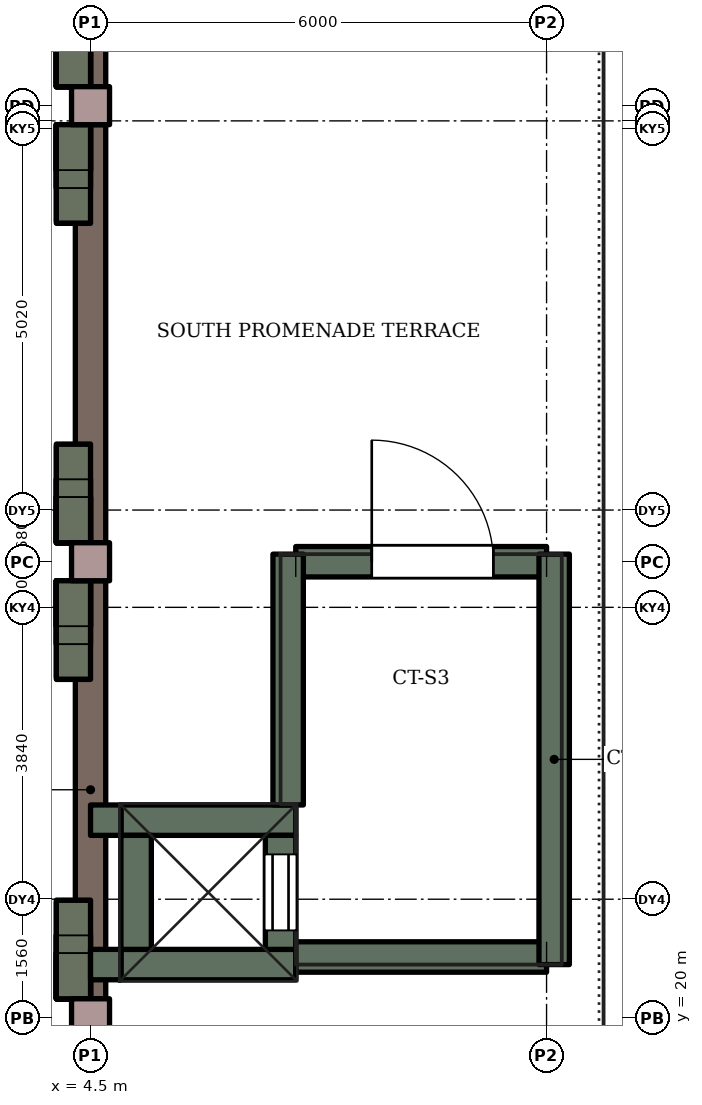
"""IFC4 building model, lengths in metres.
Left out: names, types, materials, properties, quantities, classifications, styles, units other than length and angle.
Written with IfcOpenShell. Run it as: python <this file> out.ifc"""

import sys

from ifc_helpers import new_model, si_unit, direction, frame, frame_2d, origin, origin_2d, place, context, subcontext, project, spatial, rectangle, extrude, element, fill, save


model = new_model("IFC4")
c1 = context("Model", 3, precision=1e-05, world=origin(), true_north=direction((0.0, 1.0)))
c2 = subcontext(c1, "Body", "Model", "MODEL_VIEW")
j1 = project(units=[si_unit("LENGTHUNIT", "METRE"), si_unit("PLANEANGLEUNIT", "RADIAN")], contexts=[c1])
p1 = place(None, origin())
s1 = spatial("IfcSite", under=j1, at=p1, CompositionType="ELEMENT")
p2 = place(p1, origin())
s2 = spatial("IfcBuilding", under=s1, at=p2, CompositionType="ELEMENT")
p3 = place(p2, frame((0.0, 0.0, 4.2)))
s3 = spatial("IfcBuildingStorey", under=s2, at=p3, CompositionType="ELEMENT", Elevation=4.2)
for number, where, z_axis, x_axis in (
    (1, (4.275, 20.25, -2.3), (0.0, 0.0, 1.0), (0.0, 1.0, 0.0)),
    (2, (4.275, 25.75, -2.3), (0.0, 0.0, 1.0), (0.0, -1.0, 0.0)),
):
    element("IfcWall", number, at=place(p3, frame(where, z_axis=z_axis, x_axis=x_axis)), inside=s3, PredefinedType="STANDARD", context=c2, shape_type="SweptSolid", body=[
        extrude(rectangle(XDim=0.6, YDim=0.45, at=frame_2d((0.3, 0.0))), origin(), (0.0, 0.0, 1.0), 0.8),
    ])
for number, where, z_axis, x_axis in (
    (3, (4.275, 20.25, -1.5), (0.0, 0.0, 1.0), (0.0, 1.0, 0.0)),
    (4, (4.275, 25.75, -1.5), (0.0, 0.0, 1.0), (0.0, -1.0, 0.0)),
):
    element("IfcWall", number, at=place(p3, frame(where, z_axis=z_axis, x_axis=x_axis)), inside=s3, PredefinedType="STANDARD", context=c2, shape_type="SweptSolid", body=[
        extrude(rectangle(XDim=0.831, YDim=0.45, at=frame_2d((0.416, 0.0))), origin(), (0.0, 0.0, 1.0), 0.45),
    ])
for number, where, z_axis, x_axis in (
    (5, (4.275, 20.25, -1.05), (0.0, 0.0, 1.0), (0.0, 1.0, 0.0)),
    (6, (4.275, 25.75, -1.05), (0.0, 0.0, 1.0), (0.0, -1.0, 0.0)),
):
    element("IfcWall", number, at=place(p3, frame(where, z_axis=z_axis, x_axis=x_axis)), inside=s3, PredefinedType="STANDARD", context=c2, shape_type="SweptSolid", body=[
        extrude(rectangle(XDim=1.272, YDim=0.45, at=frame_2d((0.636, 0.0))), origin(), (0.0, 0.0, 1.0), 0.1),
    ])
for number, where, z_axis, x_axis in (
    (7, (4.275, 26.25, -2.3), (0.0, 0.0, 1.0), (0.0, 1.0, 0.0)),
    (8, (4.275, 31.75, -2.3), (0.0, 0.0, 1.0), (0.0, -1.0, 0.0)),
):
    element("IfcWall", number, at=place(p3, frame(where, z_axis=z_axis, x_axis=x_axis)), inside=s3, PredefinedType="STANDARD", context=c2, shape_type="SweptSolid", body=[
        extrude(rectangle(XDim=0.6, YDim=0.45, at=frame_2d((0.3, 0.0))), origin(), (0.0, 0.0, 1.0), 0.8),
    ])
for number, where, z_axis, x_axis in (
    (9, (4.275, 26.25, -1.5), (0.0, 0.0, 1.0), (0.0, 1.0, 0.0)),
    (10, (4.275, 31.75, -1.5), (0.0, 0.0, 1.0), (0.0, -1.0, 0.0)),
):
    element("IfcWall", number, at=place(p3, frame(where, z_axis=z_axis, x_axis=x_axis)), inside=s3, PredefinedType="STANDARD", context=c2, shape_type="SweptSolid", body=[
        extrude(rectangle(XDim=0.831, YDim=0.45, at=frame_2d((0.416, 0.0))), origin(), (0.0, 0.0, 1.0), 0.45),
    ])
for number, where, z_axis, x_axis in (
    (11, (4.275, 26.25, -1.05), (0.0, 0.0, 1.0), (0.0, 1.0, 0.0)),
    (12, (4.275, 31.75, -1.05), (0.0, 0.0, 1.0), (0.0, -1.0, 0.0)),
):
    element("IfcWall", number, at=place(p3, frame(where, z_axis=z_axis, x_axis=x_axis)), inside=s3, PredefinedType="STANDARD", context=c2, shape_type="SweptSolid", body=[
        extrude(rectangle(XDim=1.272, YDim=0.45, at=frame_2d((0.636, 0.0))), origin(), (0.0, 0.0, 1.0), 0.1),
    ])
p4 = place(p3, frame((4.275, 32.25, -2.3), z_axis=(0.0, 0.0, 1.0), x_axis=(0.0, 1.0, 0.0)))
e13 = element("IfcWall", 13, at=p4, inside=s3, PredefinedType="STANDARD", context=c2, shape_type="SweptSolid", body=[
    extrude(rectangle(XDim=0.6, YDim=0.45, at=frame_2d((0.3, 0.0))), origin(), (0.0, 0.0, 1.0), 0.8),
])
p5 = place(p3, frame((4.275, 32.25, -1.5), z_axis=(0.0, 0.0, 1.0), x_axis=(0.0, 1.0, 0.0)))
e14 = element("IfcWall", 14, at=p5, inside=s3, PredefinedType="STANDARD", context=c2, shape_type="SweptSolid", body=[
    extrude(rectangle(XDim=0.831, YDim=0.45, at=frame_2d((0.416, 0.0))), origin(), (0.0, 0.0, 1.0), 0.45),
])
p6 = place(p3, frame((4.275, 32.25, -1.05), z_axis=(0.0, 0.0, 1.0), x_axis=(0.0, 1.0, 0.0)))
e15 = element("IfcWall", 15, at=p6, inside=s3, PredefinedType="STANDARD", context=c2, shape_type="SweptSolid", body=[
    extrude(rectangle(XDim=1.272, YDim=0.45, at=frame_2d((0.636, 0.0))), origin(), (0.0, 0.0, 1.0), 0.1),
])
for number, where, z_axis, x_axis in (
    (16, (4.5, 20.0, 0.0), (0.0, 0.0, 1.0), (1.0, 0.0, 0.0)),
    (17, (4.5, 26.0, 0.0), (0.0, 0.0, 1.0), (1.0, 0.0, 0.0)),
    (18, (4.5, 32.0, 0.0), (0.0, 0.0, 1.0), (1.0, 0.0, 0.0)),
):
    element("IfcColumn", number, at=place(p3, frame(where, z_axis=z_axis, x_axis=x_axis)), inside=s3, PredefinedType="COLUMN", context=c2, shape_type="SweptSolid", body=[
        extrude(rectangle(XDim=0.5, YDim=0.5, at=origin_2d()), origin(), (0.0, 0.0, 1.0), 4.2),
    ])
p7 = place(p3, frame((4.5, 20.25, 3.55), z_axis=(0.0, 0.0, 1.0), x_axis=(0.0, 1.0, 0.0)))
e19 = element("IfcWall", 19, at=p7, inside=s3, PredefinedType="STANDARD", context=c2, shape_type="SweptSolid", body=[
    extrude(rectangle(XDim=5.5, YDim=0.4, at=frame_2d((2.75, 0.0))), origin(), (0.0, 0.0, 1.0), 0.65),
])
for number, where, z_axis, x_axis in (
    (20, (4.275, 20.25, 0.0), (0.0, 0.0, 1.0), (0.0, 1.0, 0.0)),
    (21, (4.275, 25.75, 0.0), (0.0, 0.0, 1.0), (0.0, -1.0, 0.0)),
):
    element("IfcWall", number, at=place(p3, frame(where, z_axis=z_axis, x_axis=x_axis)), inside=s3, PredefinedType="STANDARD", context=c2, shape_type="SweptSolid", body=[
        extrude(rectangle(XDim=0.6, YDim=0.45, at=frame_2d((0.3, 0.0))), origin(), (0.0, 0.0, 1.0), 2.2),
    ])
for number, where, z_axis, x_axis in (
    (22, (4.275, 20.25, 2.2), (0.0, 0.0, 1.0), (0.0, 1.0, 0.0)),
    (23, (4.275, 25.75, 2.2), (0.0, 0.0, 1.0), (0.0, -1.0, 0.0)),
):
    element("IfcWall", number, at=place(p3, frame(where, z_axis=z_axis, x_axis=x_axis)), inside=s3, PredefinedType="STANDARD", context=c2, shape_type="SweptSolid", body=[
        extrude(rectangle(XDim=0.6, YDim=0.45, at=frame_2d((0.3, 0.0))), origin(), (0.0, 0.0, 1.0), 0.8),
    ])
for number, where, z_axis, x_axis in (
    (24, (4.275, 20.25, 3.0), (0.0, 0.0, 1.0), (0.0, 1.0, 0.0)),
    (25, (4.275, 25.75, 3.0), (0.0, 0.0, 1.0), (0.0, -1.0, 0.0)),
):
    element("IfcWall", number, at=place(p3, frame(where, z_axis=z_axis, x_axis=x_axis)), inside=s3, PredefinedType="STANDARD", context=c2, shape_type="SweptSolid", body=[
        extrude(rectangle(XDim=0.837, YDim=0.45, at=frame_2d((0.418, 0.0))), origin(), (0.0, 0.0, 1.0), 0.45),
    ])
for number, where, z_axis, x_axis in (
    (26, (4.275, 20.25, 3.45), (0.0, 0.0, 1.0), (0.0, 1.0, 0.0)),
    (27, (4.275, 25.75, 3.45), (0.0, 0.0, 1.0), (0.0, -1.0, 0.0)),
):
    element("IfcWall", number, at=place(p3, frame(where, z_axis=z_axis, x_axis=x_axis)), inside=s3, PredefinedType="STANDARD", context=c2, shape_type="SweptSolid", body=[
        extrude(rectangle(XDim=1.298, YDim=0.45, at=frame_2d((0.649, 0.0))), origin(), (0.0, 0.0, 1.0), 0.05),
    ])
p8 = place(p3, frame((4.5, 26.25, 3.55), z_axis=(0.0, 0.0, 1.0), x_axis=(0.0, 1.0, 0.0)))
e28 = element("IfcWall", 28, at=p8, inside=s3, PredefinedType="STANDARD", context=c2, shape_type="SweptSolid", body=[
    extrude(rectangle(XDim=5.5, YDim=0.4, at=frame_2d((2.75, 0.0))), origin(), (0.0, 0.0, 1.0), 0.65),
])
for number, where, z_axis, x_axis in (
    (29, (4.275, 26.25, 0.0), (0.0, 0.0, 1.0), (0.0, 1.0, 0.0)),
    (30, (4.275, 31.75, 0.0), (0.0, 0.0, 1.0), (0.0, -1.0, 0.0)),
):
    element("IfcWall", number, at=place(p3, frame(where, z_axis=z_axis, x_axis=x_axis)), inside=s3, PredefinedType="STANDARD", context=c2, shape_type="SweptSolid", body=[
        extrude(rectangle(XDim=0.6, YDim=0.45, at=frame_2d((0.3, 0.0))), origin(), (0.0, 0.0, 1.0), 2.2),
    ])
for number, where, z_axis, x_axis in (
    (31, (4.275, 26.25, 2.2), (0.0, 0.0, 1.0), (0.0, 1.0, 0.0)),
    (32, (4.275, 31.75, 2.2), (0.0, 0.0, 1.0), (0.0, -1.0, 0.0)),
):
    element("IfcWall", number, at=place(p3, frame(where, z_axis=z_axis, x_axis=x_axis)), inside=s3, PredefinedType="STANDARD", context=c2, shape_type="SweptSolid", body=[
        extrude(rectangle(XDim=0.6, YDim=0.45, at=frame_2d((0.3, 0.0))), origin(), (0.0, 0.0, 1.0), 0.8),
    ])
for number, where, z_axis, x_axis in (
    (33, (4.275, 26.25, 3.0), (0.0, 0.0, 1.0), (0.0, 1.0, 0.0)),
    (34, (4.275, 31.75, 3.0), (0.0, 0.0, 1.0), (0.0, -1.0, 0.0)),
):
    element("IfcWall", number, at=place(p3, frame(where, z_axis=z_axis, x_axis=x_axis)), inside=s3, PredefinedType="STANDARD", context=c2, shape_type="SweptSolid", body=[
        extrude(rectangle(XDim=0.837, YDim=0.45, at=frame_2d((0.418, 0.0))), origin(), (0.0, 0.0, 1.0), 0.45),
    ])
for number, where, z_axis, x_axis in (
    (35, (4.275, 26.25, 3.45), (0.0, 0.0, 1.0), (0.0, 1.0, 0.0)),
    (36, (4.275, 31.75, 3.45), (0.0, 0.0, 1.0), (0.0, -1.0, 0.0)),
):
    element("IfcWall", number, at=place(p3, frame(where, z_axis=z_axis, x_axis=x_axis)), inside=s3, PredefinedType="STANDARD", context=c2, shape_type="SweptSolid", body=[
        extrude(rectangle(XDim=1.298, YDim=0.45, at=frame_2d((0.649, 0.0))), origin(), (0.0, 0.0, 1.0), 0.05),
    ])
p9 = place(p3, frame((4.5, 32.25, 3.55), z_axis=(0.0, 0.0, 1.0), x_axis=(0.0, 1.0, 0.0)))
e37 = element("IfcWall", 37, at=p9, inside=s3, PredefinedType="STANDARD", context=c2, shape_type="SweptSolid", body=[
    extrude(rectangle(XDim=5.5, YDim=0.4, at=frame_2d((2.75, 0.0))), origin(), (0.0, 0.0, 1.0), 0.65),
])
p10 = place(p3, frame((4.275, 32.25, 0.0), z_axis=(0.0, 0.0, 1.0), x_axis=(0.0, 1.0, 0.0)))
e38 = element("IfcWall", 38, at=p10, inside=s3, PredefinedType="STANDARD", context=c2, shape_type="SweptSolid", body=[
    extrude(rectangle(XDim=0.6, YDim=0.45, at=frame_2d((0.3, 0.0))), origin(), (0.0, 0.0, 1.0), 2.2),
])
p11 = place(p3, frame((4.275, 32.25, 2.2), z_axis=(0.0, 0.0, 1.0), x_axis=(0.0, 1.0, 0.0)))
e39 = element("IfcWall", 39, at=p11, inside=s3, PredefinedType="STANDARD", context=c2, shape_type="SweptSolid", body=[
    extrude(rectangle(XDim=0.6, YDim=0.45, at=frame_2d((0.3, 0.0))), origin(), (0.0, 0.0, 1.0), 0.8),
])
p12 = place(p3, frame((4.275, 32.25, 3.0), z_axis=(0.0, 0.0, 1.0), x_axis=(0.0, 1.0, 0.0)))
e40 = element("IfcWall", 40, at=p12, inside=s3, PredefinedType="STANDARD", context=c2, shape_type="SweptSolid", body=[
    extrude(rectangle(XDim=0.837, YDim=0.45, at=frame_2d((0.418, 0.0))), origin(), (0.0, 0.0, 1.0), 0.45),
])
p13 = place(p3, frame((4.275, 32.25, 3.45), z_axis=(0.0, 0.0, 1.0), x_axis=(0.0, 1.0, 0.0)))
e41 = element("IfcWall", 41, at=p13, inside=s3, PredefinedType="STANDARD", context=c2, shape_type="SweptSolid", body=[
    extrude(rectangle(XDim=1.298, YDim=0.45, at=frame_2d((0.649, 0.0))), origin(), (0.0, 0.0, 1.0), 0.05),
])
for number, where, z_axis, x_axis in (
    (42, (4.9, 20.7, 0.0), (0.0, 0.0, 1.0), (1.0, 0.0, 0.0)),
    (43, (4.9, 22.6, 0.0), (0.0, 0.0, 1.0), (1.0, 0.0, 0.0)),
):
    element("IfcWall", number, at=place(p3, frame(where, z_axis=z_axis, x_axis=x_axis)), inside=s3, PredefinedType="SHEAR", context=c2, shape_type="SweptSolid", body=[
        extrude(rectangle(XDim=2.3, YDim=0.4, at=frame_2d((1.15, 0.0))), origin(), (0.0, 0.0, 1.0), 3.95),
    ])
p14 = place(p3, frame((5.1, 20.9, 0.0), z_axis=(0.0, 0.0, 1.0), x_axis=(0.0, 1.0, 0.0)))
e44 = element("IfcWall", 44, at=p14, inside=s3, PredefinedType="SHEAR", context=c2, shape_type="SweptSolid", body=[
    extrude(rectangle(XDim=1.5, YDim=0.4, at=frame_2d((0.75, 0.0))), origin(), (0.0, 0.0, 1.0), 3.95),
])
p15 = place(p3, frame((7.0, 20.9, 0.0), z_axis=(0.0, 0.0, 1.0), x_axis=(0.0, 1.0, 0.0)))
e45 = element("IfcWall", 45, at=p15, inside=s3, PredefinedType="SHEAR", context=c2, shape_type="SweptSolid", body=[
    extrude(rectangle(XDim=1.5, YDim=0.4, at=frame_2d((0.75, 0.0))), origin(), (0.0, 0.0, 1.0), 3.95),
])
p16 = place(p15, frame((0.25, 0.0, 0.0)))
e46 = element("IfcOpeningElement", 46, at=p16, cuts=e45, PredefinedType="OPENING", context=c2, shape_type="SweptSolid", body=[
    extrude(rectangle(XDim=1.0, YDim=2.1, at=frame_2d((0.5, 1.05))), frame((0.0, 0.21, 0.0), z_axis=(0.0, -1.0, 0.0), x_axis=(1.0, 0.0, 0.0)), (0.0, 0.0, 1.0), 0.42),
])
for number, where, z_axis, x_axis in (
    (47, (4.5, 20.7, 0.0), (0.0, 0.0, 1.0), (1.0, 0.0, 0.0)),
    (48, (4.5, 22.6, 0.0), (0.0, 0.0, 1.0), (1.0, 0.0, 0.0)),
):
    element("IfcWall", number, at=place(p3, frame(where, z_axis=z_axis, x_axis=x_axis)), inside=s3, PredefinedType="SHEAR", context=c2, shape_type="SweptSolid", body=[
        extrude(rectangle(XDim=0.4, YDim=0.4, at=frame_2d((0.2, 0.0))), origin(), (0.0, 0.0, 1.0), 3.5),
    ])
p17 = place(p3, frame((7.2, 20.8, 0.0), z_axis=(0.0, 0.0, 1.0), x_axis=(1.0, 0.0, 0.0)))
e49 = element("IfcWall", 49, at=p17, inside=s3, PredefinedType="SHEAR", context=c2, shape_type="SweptSolid", body=[
    extrude(rectangle(XDim=3.3, YDim=0.4, at=frame_2d((1.65, 0.0))), origin(), (0.0, 0.0, 1.0), 3.0),
])
p18 = place(p3, frame((7.2, 26.0, 0.0), z_axis=(0.0, 0.0, 1.0), x_axis=(1.0, 0.0, 0.0)))
e50 = element("IfcWall", 50, at=p18, inside=s3, PredefinedType="SHEAR", context=c2, shape_type="SweptSolid", body=[
    extrude(rectangle(XDim=3.3, YDim=0.4, at=frame_2d((1.65, 0.0))), origin(), (0.0, 0.0, 1.0), 3.0),
])
p19 = place(p18, frame((1.0, 0.0, 0.0)))
e51 = element("IfcOpeningElement", 51, at=p19, cuts=e50, PredefinedType="OPENING", context=c2, shape_type="SweptSolid", body=[
    extrude(rectangle(XDim=1.6, YDim=2.1, at=frame_2d((0.8, 1.05))), frame((0.0, 0.21, 0.0), z_axis=(0.0, -1.0, 0.0), x_axis=(1.0, 0.0, 0.0)), (0.0, 0.0, 1.0), 0.42),
])
p20 = place(p3, frame((10.6, 20.7, 0.0), z_axis=(0.0, 0.0, 1.0), x_axis=(0.0, 1.0, 0.0)))
e52 = element("IfcWall", 52, at=p20, inside=s3, PredefinedType="SHEAR", context=c2, shape_type="SweptSolid", body=[
    extrude(rectangle(XDim=5.4, YDim=0.4, at=frame_2d((2.7, 0.0))), origin(), (0.0, 0.0, 1.0), 3.0),
])
p21 = place(p3, frame((7.1, 22.8, 0.0), z_axis=(0.0, 0.0, 1.0), x_axis=(0.0, 1.0, 0.0)))
e53 = element("IfcWall", 53, at=p21, inside=s3, PredefinedType="SHEAR", context=c2, shape_type="SweptSolid", body=[
    extrude(rectangle(XDim=3.3, YDim=0.4, at=frame_2d((1.65, 0.0))), origin(), (0.0, 0.0, 1.0), 3.0),
])
p22 = place(p16, origin())
e54 = element("IfcDoor", 54, at=p22, inside=s3, OperationType="SLIDING_TO_LEFT", PredefinedType="DOOR", context=c2, shape_type="SweptSolid", body=[
    extrude(rectangle(XDim=1.0, YDim=2.1, at=frame_2d((0.5, 1.05))), frame((0.0, 0.025, 0.0), z_axis=(0.0, -1.0, 0.0), x_axis=(1.0, 0.0, 0.0)), (0.0, 0.0, 1.0), 0.05),
])
fill(e46, e54)
p23 = place(p19, origin())
e55 = element("IfcDoor", 55, at=p23, inside=s3, OperationType="SINGLE_SWING_LEFT", PredefinedType="DOOR", context=c2, shape_type="SweptSolid", body=[
    extrude(rectangle(XDim=1.6, YDim=2.1, at=frame_2d((0.8, 1.05))), frame((0.0, 0.025, 0.0), z_axis=(0.0, -1.0, 0.0), x_axis=(1.0, 0.0, 0.0)), (0.0, 0.0, 1.0), 0.05),
])
fill(e51, e55)
save(model, sys.argv[1])
